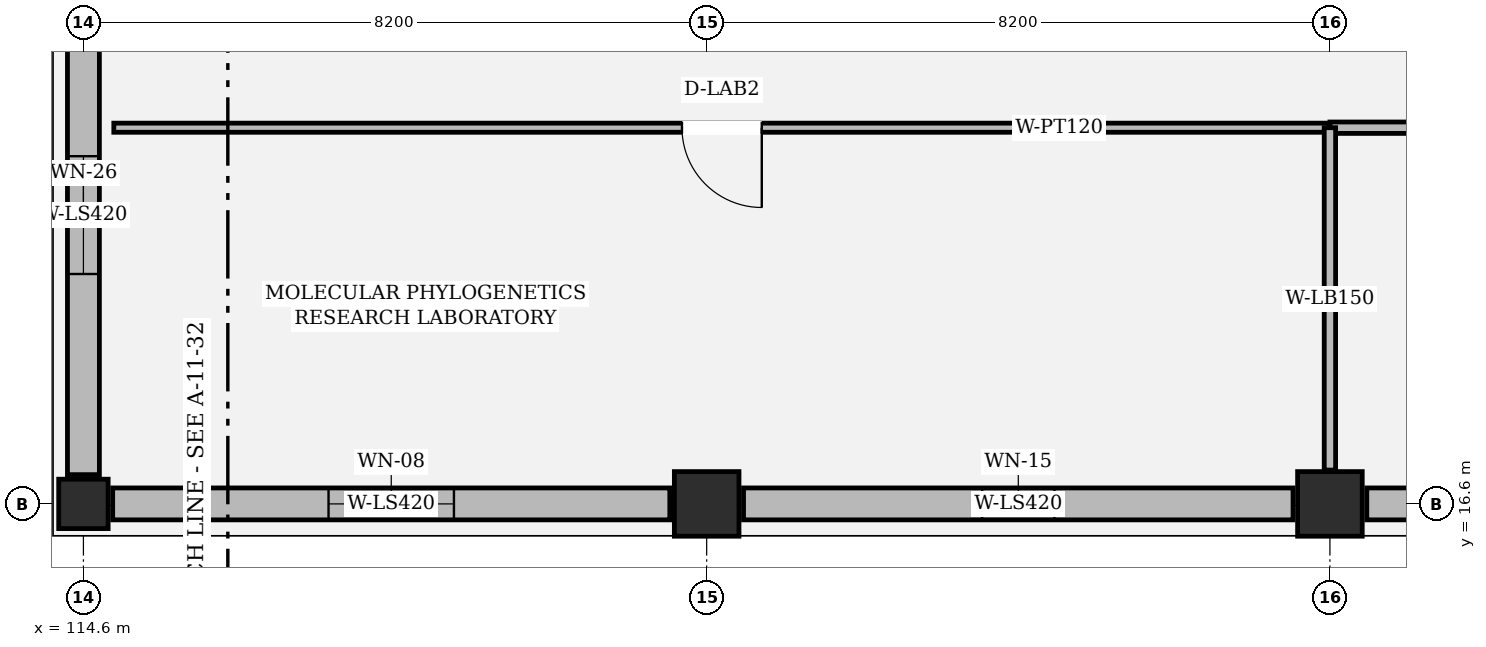
"""IFC4 building model, lengths in metres.
Left out: names, types, materials, properties, quantities, classifications, styles, units other than length and angle.
Written with IfcOpenShell. Run it as: python <this file> out.ifc"""

import sys

from ifc_helpers import new_model, si_unit, direction, frame, frame_2d, origin, origin_2d, place, context, subcontext, project, spatial, rectangle, extrude, element, fill, save


model = new_model("IFC4")
c1 = context("Model", 3, precision=1e-05, world=origin(), true_north=direction((0.0, 1.0)))
c2 = subcontext(c1, "Body", "Model", "MODEL_VIEW")
j1 = project(units=[si_unit("LENGTHUNIT", "METRE"), si_unit("PLANEANGLEUNIT", "RADIAN")], contexts=[c1])
p1 = place(None, origin())
s1 = spatial("IfcSite", under=j1, at=p1, CompositionType="ELEMENT")
p2 = place(p1, origin())
s2 = spatial("IfcBuilding", under=s1, at=p2, CompositionType="ELEMENT")
p3 = place(p2, frame((0.0, 0.0, 15.0)))
s3 = spatial("IfcBuildingStorey", under=s2, at=p3, CompositionType="ELEMENT", Elevation=15.0)
p4 = place(p3, frame((114.6, 16.6, 0.0), z_axis=(0.0, 0.0, 1.0), x_axis=(1.0, 0.0, 0.0)))
e1 = element("IfcColumn", 1, at=p4, inside=s3, PredefinedType="COLUMN", context=c2, shape_type="SweptSolid", body=[
    extrude(rectangle(XDim=0.65, YDim=0.65, at=origin_2d()), origin(), (0.0, 0.0, 1.0), 4.545),
])
for number, where, z_axis, x_axis in (
    (2, (122.8, 16.6, 0.0), (0.0, 0.0, 1.0), (1.0, 0.0, 0.0)),
    (3, (131.0, 16.6, 0.0), (0.0, 0.0, 1.0), (1.0, 0.0, 0.0)),
):
    element("IfcColumn", number, at=place(p3, frame(where, z_axis=z_axis, x_axis=x_axis)), inside=s3, PredefinedType="COLUMN", context=c2, shape_type="SweptSolid", body=[
        extrude(rectangle(XDim=0.85, YDim=0.85, at=origin_2d()), origin(), (0.0, 0.0, 1.0), 4.545),
    ])
p5 = place(p3, frame((114.985, 16.6, 0.0), z_axis=(0.0, 0.0, 1.0), x_axis=(1.0, 0.0, 0.0)))
e4 = element("IfcWall", 4, at=p5, inside=s3, PredefinedType="SOLIDWALL", context=c2, shape_type="SweptSolid", body=[
    extrude(rectangle(XDim=7.33, YDim=0.42, at=frame_2d((3.665, 0.0))), origin(), (0.0, 0.0, 1.0), 3.93),
])
p6 = place(p5, frame((2.84, 0.0, 0.95)))
e5 = element("IfcOpeningElement", 5, at=p6, cuts=e4, PredefinedType="OPENING", context=c2, shape_type="SweptSolid", body=[
    extrude(rectangle(XDim=1.65, YDim=2.0, at=frame_2d((0.825, 1.0))), frame((0.0, 0.222, 0.0), z_axis=(0.0, -1.0, 0.0), x_axis=(1.0, 0.0, 0.0)), (0.0, 0.0, 1.0), 0.444),
])
p7 = place(p3, frame((123.285, 16.6, 0.0), z_axis=(0.0, 0.0, 1.0), x_axis=(1.0, 0.0, 0.0)))
e6 = element("IfcWall", 6, at=p7, inside=s3, PredefinedType="SOLIDWALL", context=c2, shape_type="SweptSolid", body=[
    extrude(rectangle(XDim=7.23, YDim=0.42, at=frame_2d((3.615, 0.0))), origin(), (0.0, 0.0, 1.0), 3.93),
])
p8 = place(p7, frame((3.14, 0.0, 0.95)))
e7 = element("IfcOpeningElement", 7, at=p8, cuts=e6, PredefinedType="OPENING", context=c2, shape_type="SweptSolid", body=[
    extrude(rectangle(XDim=0.95, YDim=1.75, at=frame_2d((0.475, 0.875))), frame((0.0, 0.222, 0.0), z_axis=(0.0, -1.0, 0.0), x_axis=(1.0, 0.0, 0.0)), (0.0, 0.0, 1.0), 0.444),
])
p9 = place(p3, frame((131.485, 16.6, 0.0), z_axis=(0.0, 0.0, 1.0), x_axis=(1.0, 0.0, 0.0)))
e8 = element("IfcWall", 8, at=p9, inside=s3, PredefinedType="SOLIDWALL", context=c2, shape_type="SweptSolid", body=[
    extrude(rectangle(XDim=7.23, YDim=0.42, at=frame_2d((3.615, 0.0))), origin(), (0.0, 0.0, 1.0), 3.93),
])
p10 = place(p9, frame((3.04, 0.0, 0.95)))
e9 = element("IfcOpeningElement", 9, at=p10, cuts=e8, PredefinedType="OPENING", context=c2, shape_type="SweptSolid", body=[
    extrude(rectangle(XDim=1.15, YDim=1.5, at=frame_2d((0.575, 0.75))), frame((0.0, 0.222, 0.0), z_axis=(0.0, -1.0, 0.0), x_axis=(1.0, 0.0, 0.0)), (0.0, 0.0, 1.0), 0.444),
])
p11 = place(p3, frame((114.6, 23.815, 0.0), z_axis=(0.0, 0.0, 1.0), x_axis=(0.0, -1.0, 0.0)))
e10 = element("IfcWall", 10, at=p11, inside=s3, PredefinedType="SOLIDWALL", context=c2, shape_type="SweptSolid", body=[
    extrude(rectangle(XDim=6.83, YDim=0.42, at=frame_2d((3.415, 0.0))), origin(), (0.0, 0.0, 1.0), 3.93),
])
p12 = place(p11, frame((2.64, 0.0, 0.95)))
e11 = element("IfcOpeningElement", 11, at=p12, cuts=e10, PredefinedType="OPENING", context=c2, shape_type="SweptSolid", body=[
    extrude(rectangle(XDim=1.55, YDim=1.5, at=frame_2d((0.775, 0.75))), frame((0.0, 0.222, 0.0), z_axis=(0.0, -1.0, 0.0), x_axis=(1.0, 0.0, 0.0)), (0.0, 0.0, 1.0), 0.444),
])
p13 = place(p3, frame((131.0, 21.55, 0.0), z_axis=(0.0, 0.0, 1.0), x_axis=(-1.0, 0.0, 0.0)))
e12 = element("IfcWall", 12, at=p13, inside=s3, PredefinedType="PARTITIONING", context=c2, shape_type="SweptSolid", body=[
    extrude(rectangle(XDim=16.0, YDim=0.12, at=frame_2d((8.0, 0.0))), origin(), (0.0, 0.0, 1.0), 4.155),
])
p14 = place(p13, frame((7.475, 0.0, 0.0)))
e13 = element("IfcOpeningElement", 13, at=p14, cuts=e12, PredefinedType="OPENING", context=c2, shape_type="SweptSolid", body=[
    extrude(rectangle(XDim=1.05, YDim=2.2, at=frame_2d((0.525, 1.1))), frame((0.0, 0.072, 0.0), z_axis=(0.0, -1.0, 0.0), x_axis=(1.0, 0.0, 0.0)), (0.0, 0.0, 1.0), 0.144),
])
p15 = place(p3, frame((147.95, 21.55, 0.0), z_axis=(0.0, 0.0, 1.0), x_axis=(-1.0, 0.0, 0.0)))
e14 = element("IfcWall", 14, at=p15, inside=s3, PredefinedType="PARTITIONING", context=c2, shape_type="SweptSolid", body=[
    extrude(rectangle(XDim=16.95, YDim=0.15, at=frame_2d((8.475, 0.0))), origin(), (0.0, 0.0, 1.0), 4.055),
])
p16 = place(p15, frame((7.775, 0.0, 0.0)))
e15 = element("IfcOpeningElement", 15, at=p16, cuts=e14, PredefinedType="OPENING", context=c2, shape_type="SweptSolid", body=[
    extrude(rectangle(XDim=1.4, YDim=2.2, at=frame_2d((0.7, 1.1))), frame((0.0, 0.087, 0.0), z_axis=(0.0, -1.0, 0.0), x_axis=(1.0, 0.0, 0.0)), (0.0, 0.0, 1.0), 0.174),
])
p17 = place(p3, frame((131.0, 21.55, 0.0), z_axis=(0.0, 0.0, 1.0), x_axis=(0.0, -1.0, 0.0)))
e16 = element("IfcWall", 16, at=p17, inside=s3, PredefinedType="PARTITIONING", context=c2, shape_type="SweptSolid", body=[
    extrude(rectangle(XDim=4.505, YDim=0.15, at=frame_2d((2.252, 0.0))), origin(), (0.0, 0.0, 1.0), 3.765),
])
p18 = place(p6, origin())
e17 = element("IfcWindow", 17, at=p18, inside=s3, PartitioningType="DOUBLE_PANEL_VERTICAL", PredefinedType="WINDOW", context=c2, shape_type="SweptSolid", body=[
    extrude(rectangle(XDim=1.65, YDim=2.0, at=frame_2d((0.825, 1.0))), frame((0.0, 0.03, 0.0), z_axis=(0.0, -1.0, 0.0), x_axis=(1.0, 0.0, 0.0)), (0.0, 0.0, 1.0), 0.06),
])
fill(e5, e17)
p19 = place(p8, origin())
e18 = element("IfcWindow", 18, at=p19, inside=s3, PartitioningType="SINGLE_PANEL", PredefinedType="WINDOW", context=c2, shape_type="SweptSolid", body=[
    extrude(rectangle(XDim=0.95, YDim=1.75, at=frame_2d((0.475, 0.875))), frame((0.0, 0.03, 0.0), z_axis=(0.0, -1.0, 0.0), x_axis=(1.0, 0.0, 0.0)), (0.0, 0.0, 1.0), 0.06),
])
fill(e7, e18)
p20 = place(p12, origin())
e19 = element("IfcWindow", 19, at=p20, inside=s3, PartitioningType="DOUBLE_PANEL_VERTICAL", PredefinedType="WINDOW", context=c2, shape_type="SweptSolid", body=[
    extrude(rectangle(XDim=1.55, YDim=1.5, at=frame_2d((0.775, 0.75))), frame((0.0, 0.03, 0.0), z_axis=(0.0, -1.0, 0.0), x_axis=(1.0, 0.0, 0.0)), (0.0, 0.0, 1.0), 0.06),
])
fill(e11, e19)
p21 = place(p14, origin())
e20 = element("IfcDoor", 20, at=p21, inside=s3, OperationType="SINGLE_SWING_LEFT", PredefinedType="DOOR", context=c2, shape_type="SweptSolid", body=[
    extrude(rectangle(XDim=1.05, YDim=2.2, at=frame_2d((0.525, 1.1))), frame((0.0, 0.025, 0.0), z_axis=(0.0, -1.0, 0.0), x_axis=(1.0, 0.0, 0.0)), (0.0, 0.0, 1.0), 0.05),
])
fill(e13, e20)
save(model, sys.argv[1])
